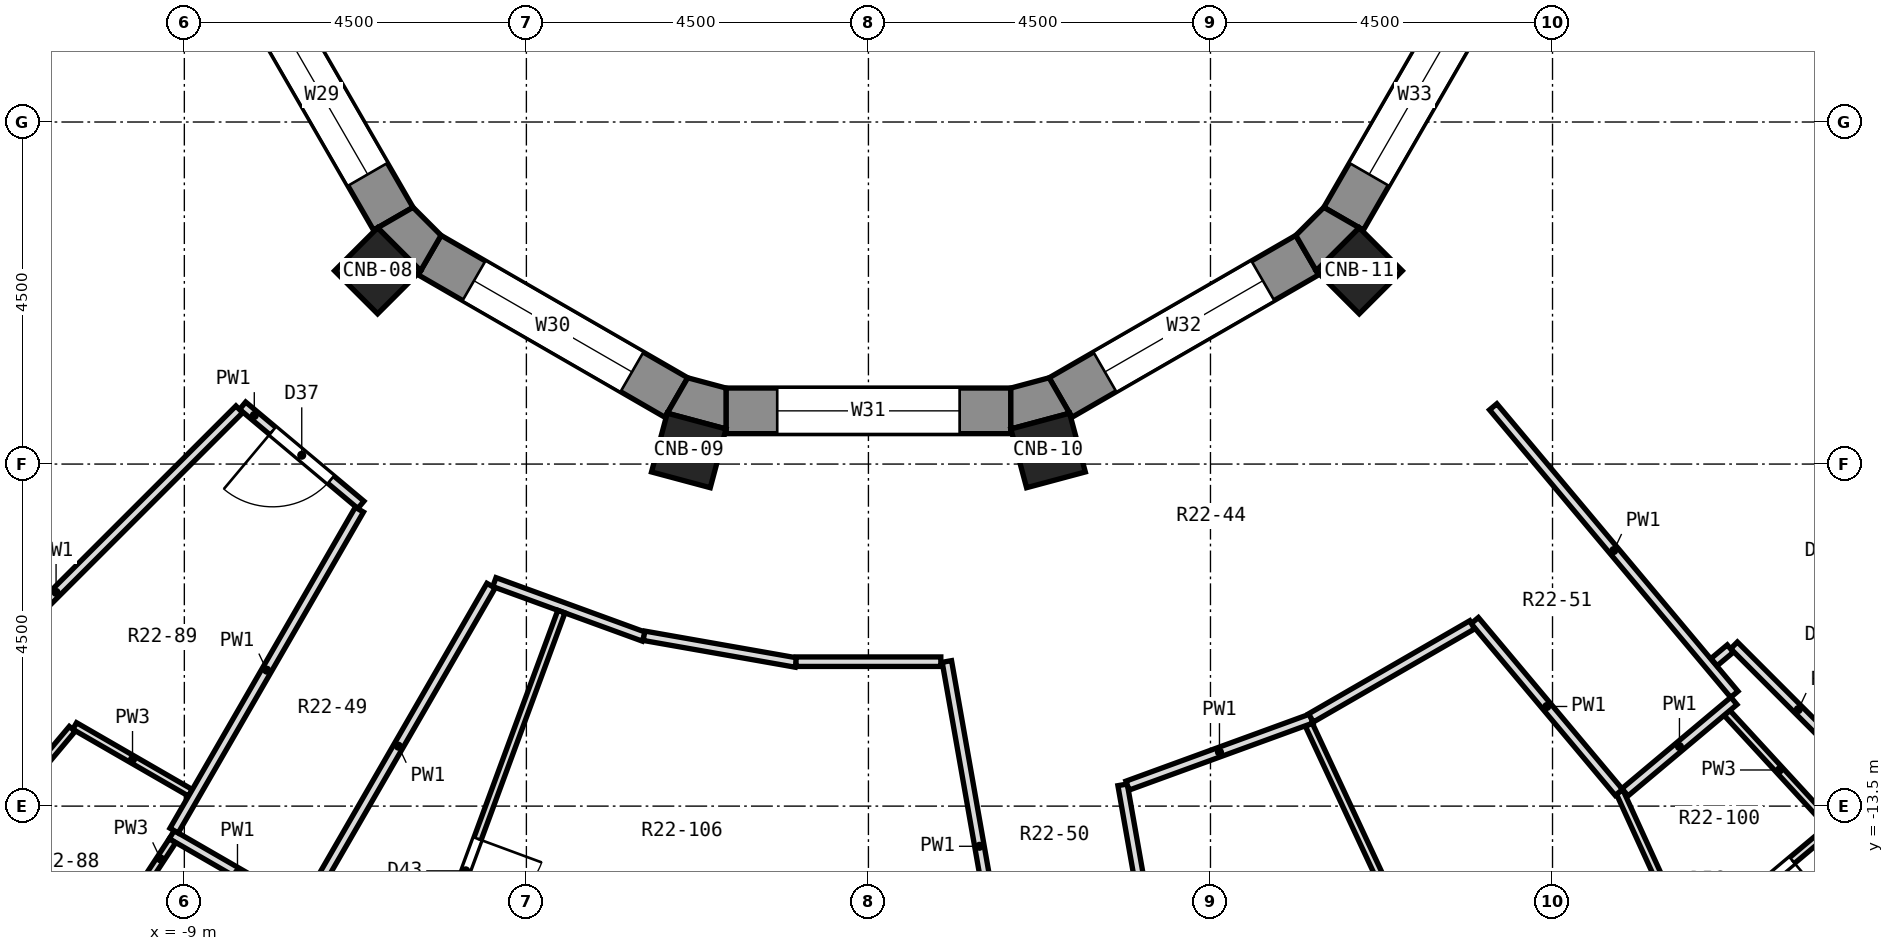
"""IFC4 building model, lengths in metres.
Left out: names, types, materials, properties, quantities, classifications, styles, units other than length and angle.
Written with IfcOpenShell. Run it as: python <this file> out.ifc"""

import sys

from ifc_helpers import new_model, si_unit, direction, frame, frame_2d, origin, origin_2d, place, context, subcontext, project, spatial, polyline, rectangle, outline, extrude, element, fill, save


model = new_model("IFC4")
c1 = context("Model", 3, precision=1e-05, world=origin(), true_north=direction((0.0, 1.0)))
c2 = subcontext(c1, "Body", "Model", "MODEL_VIEW")
j1 = project(units=[si_unit("LENGTHUNIT", "METRE"), si_unit("PLANEANGLEUNIT", "RADIAN")], contexts=[c1])
p1 = place(None, origin())
s1 = spatial("IfcSite", under=j1, at=p1, CompositionType="ELEMENT")
p2 = place(p1, origin())
s2 = spatial("IfcBuilding", under=s1, at=p2, CompositionType="ELEMENT")
p3 = place(p2, frame((0.0, 0.0, 141.4)))
s3 = spatial("IfcBuildingStorey", under=s2, at=p3, CompositionType="ELEMENT", Elevation=141.4)
for number, where, z_axis, x_axis in (
    (1, (-6.458, -6.458, 0.0), (0.0, 0.0, 1.0), (-0.707, -0.707, 0.0)),
    (2, (-2.364, -8.821, 0.0), (0.0, 0.0, 1.0), (-0.259, -0.966, 0.0)),
    (3, (2.364, -8.821, 0.0), (0.0, 0.0, 1.0), (0.259, -0.966, 0.0)),
    (4, (6.458, -6.458, 0.0), (0.0, 0.0, 1.0), (0.707, -0.707, 0.0)),
):
    element("IfcColumn", number, at=place(p3, frame(where, z_axis=z_axis, x_axis=x_axis)), inside=s3, PredefinedType="COLUMN", context=c2, shape_type="SweptSolid", body=[
        extrude(rectangle(XDim=0.8, YDim=0.8, at=origin_2d()), origin(), (0.0, 0.0, 1.0), 3.3),
    ])
p4 = place(p3, frame((-8.125, -2.527, 0.0), z_axis=(0.0, 0.0, 1.0), x_axis=(0.499964958637, -0.86604563398, 0.0)))
e5 = element("IfcWall", 5, at=p4, inside=s3, PredefinedType="SOLIDWALL", context=c2, shape_type="SweptSolid", body=[
    extrude(rectangle(XDim=3.747, YDim=0.6, at=frame_2d((1.874, 0.0))), origin(), (0.0, 0.0, 1.0), 2.8),
])
p5 = place(p4, frame((0.674, 0.0, 0.9)))
e6 = element("IfcOpeningElement", 6, at=p5, cuts=e5, PredefinedType="OPENING", context=c2, shape_type="SweptSolid", body=[
    extrude(rectangle(XDim=2.4, YDim=1.8, at=frame_2d((1.2, 0.9))), frame((0.0, 0.312, 0.0), z_axis=(0.0, -1.0, 0.0), x_axis=(1.0, 0.0, 0.0)), (0.0, 0.0, 1.0), 0.624),
])
p6 = place(p3, frame((-5.773, -6.251, 0.0), z_axis=(0.0, 0.0, 1.0), x_axis=(0.86604563398, -0.499964958637, 0.0)))
e7 = element("IfcWall", 7, at=p6, inside=s3, PredefinedType="SOLIDWALL", context=c2, shape_type="SweptSolid", body=[
    extrude(rectangle(XDim=3.747, YDim=0.6, at=frame_2d((1.874, 0.0))), origin(), (0.0, 0.0, 1.0), 2.8),
])
p7 = place(p6, frame((0.674, 0.0, 0.9)))
e8 = element("IfcOpeningElement", 8, at=p7, cuts=e7, PredefinedType="OPENING", context=c2, shape_type="SweptSolid", body=[
    extrude(rectangle(XDim=2.4, YDim=1.8, at=frame_2d((1.2, 0.9))), frame((0.0, 0.312, 0.0), z_axis=(0.0, -1.0, 0.0), x_axis=(1.0, 0.0, 0.0)), (0.0, 0.0, 1.0), 0.624),
])
p8 = place(p3, frame((-1.874, -8.3, 0.0), z_axis=(0.0, 0.0, 1.0), x_axis=(1.0, 0.0, 0.0)))
e9 = element("IfcWall", 9, at=p8, inside=s3, PredefinedType="SOLIDWALL", context=c2, shape_type="SweptSolid", body=[
    extrude(rectangle(XDim=3.748, YDim=0.6, at=frame_2d((1.874, 0.0))), origin(), (0.0, 0.0, 1.0), 2.8),
])
p9 = place(p8, frame((0.674, 0.0, 0.9)))
e10 = element("IfcOpeningElement", 10, at=p9, cuts=e9, PredefinedType="OPENING", context=c2, shape_type="SweptSolid", body=[
    extrude(rectangle(XDim=2.4, YDim=1.8, at=frame_2d((1.2, 0.9))), frame((0.0, 0.312, 0.0), z_axis=(0.0, -1.0, 0.0), x_axis=(1.0, 0.0, 0.0)), (0.0, 0.0, 1.0), 0.624),
])
p10 = place(p3, frame((2.527, -8.125, 0.0), z_axis=(0.0, 0.0, 1.0), x_axis=(0.86604563398, 0.499964958637, 0.0)))
e11 = element("IfcWall", 11, at=p10, inside=s3, PredefinedType="SOLIDWALL", context=c2, shape_type="SweptSolid", body=[
    extrude(rectangle(XDim=3.747, YDim=0.6, at=frame_2d((1.874, 0.0))), origin(), (0.0, 0.0, 1.0), 2.8),
])
p11 = place(p10, frame((0.674, 0.0, 0.9)))
e12 = element("IfcOpeningElement", 12, at=p11, cuts=e11, PredefinedType="OPENING", context=c2, shape_type="SweptSolid", body=[
    extrude(rectangle(XDim=2.4, YDim=1.8, at=frame_2d((1.2, 0.9))), frame((0.0, 0.312, 0.0), z_axis=(0.0, -1.0, 0.0), x_axis=(1.0, 0.0, 0.0)), (0.0, 0.0, 1.0), 0.624),
])
p12 = place(p3, frame((6.251, -5.773, 0.0), z_axis=(0.0, 0.0, 1.0), x_axis=(0.499964958637, 0.86604563398, 0.0)))
e13 = element("IfcWall", 13, at=p12, inside=s3, PredefinedType="SOLIDWALL", context=c2, shape_type="SweptSolid", body=[
    extrude(rectangle(XDim=3.747, YDim=0.6, at=frame_2d((1.874, 0.0))), origin(), (0.0, 0.0, 1.0), 2.8),
])
p13 = place(p12, frame((0.674, 0.0, 0.9)))
e14 = element("IfcOpeningElement", 14, at=p13, cuts=e13, PredefinedType="OPENING", context=c2, shape_type="SweptSolid", body=[
    extrude(rectangle(XDim=2.4, YDim=1.8, at=frame_2d((1.2, 0.9))), frame((0.0, 0.312, 0.0), z_axis=(0.0, -1.0, 0.0), x_axis=(1.0, 0.0, 0.0)), (0.0, 0.0, 1.0), 0.624),
])
p14 = place(p3, origin())
e15 = element("IfcWall", 15, at=p14, inside=s3, PredefinedType="SOLIDWALL", context=c2, shape_type="SweptSolid", body=[
    extrude(outline(polyline([(-6.458, -5.892), (-5.892, -6.458), (-5.623, -5.991), (-5.991, -5.623), (-6.458, -5.892)])), origin(), (0.0, 0.0, 1.0), 2.8),
])
p15 = place(p3, origin())
e16 = element("IfcWall", 16, at=p15, inside=s3, PredefinedType="SOLIDWALL", context=c2, shape_type="SweptSolid", body=[
    extrude(outline(polyline([(-1.874, -8.538), (-1.874, -8.0), (-2.377, -7.865), (-2.646, -8.331), (-1.874, -8.538)])), origin(), (0.0, 0.0, 1.0), 2.8),
])
p16 = place(p3, origin())
e17 = element("IfcWall", 17, at=p16, inside=s3, PredefinedType="SOLIDWALL", context=c2, shape_type="SweptSolid", body=[
    extrude(outline(polyline([(2.646, -8.331), (2.377, -7.865), (1.874, -8.0), (1.874, -8.538), (2.646, -8.331)])), origin(), (0.0, 0.0, 1.0), 2.8),
])
p17 = place(p3, origin())
e18 = element("IfcWall", 18, at=p17, inside=s3, PredefinedType="SOLIDWALL", context=c2, shape_type="SweptSolid", body=[
    extrude(outline(polyline([(5.892, -6.458), (6.458, -5.892), (5.991, -5.623), (5.623, -5.991), (5.892, -6.458)])), origin(), (0.0, 0.0, 1.0), 2.8),
])
p18 = place(p3, frame((1.032, -11.597, 0.0), z_axis=(0.0, 0.0, 1.0), x_axis=(0.173613257536, -0.984813909735, 0.0)))
e19 = element("IfcWall", 19, at=p18, inside=s3, PredefinedType="PARTITIONING", context=c2, shape_type="SweptSolid", body=[
    extrude(rectangle(XDim=4.937, YDim=0.125, at=frame_2d((2.469, 0.0))), origin(), (0.0, 0.0, 1.0), 2.8),
])
p19 = place(p3, frame((3.344, -13.22, 0.0), z_axis=(0.0, 0.0, 1.0), x_axis=(0.173704731119, -0.984797779438, 0.0)))
e20 = element("IfcWall", 20, at=p19, inside=s3, PredefinedType="PARTITIONING", context=c2, shape_type="SweptSolid", body=[
    extrude(rectangle(XDim=2.938, YDim=0.125, at=frame_2d((1.469, 0.0))), origin(), (0.0, 0.0, 1.0), 2.8),
])
p20 = place(p3, frame((9.883, -13.312, 0.0), z_axis=(0.0, 0.0, 1.0), x_axis=(0.415273903312, -0.909696424764, 0.0)))
e21 = element("IfcWall", 21, at=p20, inside=s3, PredefinedType="PARTITIONING", context=c2, shape_type="SweptSolid", body=[
    extrude(rectangle(XDim=5.0, YDim=0.1, at=frame_2d((2.5, 0.0))), origin(), (0.0, 0.0, 1.0), 2.8),
])
p21 = place(p20, frame((3.166, 0.0, 0.0)))
e22 = element("IfcOpeningElement", 22, at=p21, cuts=e21, PredefinedType="OPENING", context=c2, shape_type="SweptSolid", body=[
    extrude(rectangle(XDim=0.9, YDim=2.1, at=frame_2d((0.45, 1.05))), frame((0.0, 0.062, 0.0), z_axis=(0.0, -1.0, 0.0), x_axis=(1.0, 0.0, 0.0)), (0.0, 0.0, 1.0), 0.124),
])
p22 = place(p3, frame((5.794, -12.43, 0.0), z_axis=(0.0, 0.0, 1.0), x_axis=(0.422795993745, -0.906224888023, 0.0)))
e23 = element("IfcWall", 23, at=p22, inside=s3, PredefinedType="PARTITIONING", context=c2, shape_type="SweptSolid", body=[
    extrude(rectangle(XDim=11.951, YDim=0.1, at=frame_2d((5.975, 0.0))), origin(), (0.0, 0.0, 1.0), 2.8),
])
p23 = place(p22, frame((3.451, 0.0, 0.0)))
e24 = element("IfcOpeningElement", 24, at=p23, cuts=e23, PredefinedType="OPENING", context=c2, shape_type="SweptSolid", body=[
    extrude(rectangle(XDim=0.9, YDim=2.1, at=frame_2d((0.45, 1.05))), frame((0.0, 0.062, 0.0), z_axis=(0.0, -1.0, 0.0), x_axis=(1.0, 0.0, 0.0)), (0.0, 0.0, 1.0), 0.124),
])
p24 = place(p3, frame((7.977, -11.059, 0.0), z_axis=(0.0, 0.0, 1.0), x_axis=(0.642679638204, -0.766135028985, 0.0)))
e25 = element("IfcWall", 25, at=p24, inside=s3, PredefinedType="PARTITIONING", context=c2, shape_type="SweptSolid", body=[
    extrude(rectangle(XDim=2.95, YDim=0.125, at=frame_2d((1.475, 0.0))), origin(), (0.0, 0.0, 1.0), 2.8),
])
p25 = place(p3, frame((8.22, -8.247, 0.0), z_axis=(0.0, 0.0, 1.0), x_axis=(0.642555132876, -0.766239454228, 0.0)))
e26 = element("IfcWall", 26, at=p25, inside=s3, PredefinedType="PARTITIONING", context=c2, shape_type="SweptSolid", body=[
    extrude(rectangle(XDim=4.937, YDim=0.125, at=frame_2d((2.468, 0.0))), origin(), (0.0, 0.0, 1.0), 2.8),
])
p26 = place(p3, frame((11.295, -12.274, 0.0), z_axis=(0.0, 0.0, 1.0), x_axis=(0.676981317167, -0.736000201228, 0.0)))
e27 = element("IfcWall", 27, at=p26, inside=s3, PredefinedType="PARTITIONING", context=c2, shape_type="SweptSolid", body=[
    extrude(rectangle(XDim=2.039, YDim=0.1, at=frame_2d((1.02, 0.0))), origin(), (0.0, 0.0, 1.0), 2.8),
])
p27 = place(p3, frame((11.388, -11.385, 0.0), z_axis=(0.0, 0.0, 1.0), x_axis=(0.707157874563, -0.707055684118, 0.0)))
e28 = element("IfcWall", 28, at=p27, inside=s3, PredefinedType="PARTITIONING", context=c2, shape_type="SweptSolid", body=[
    extrude(rectangle(XDim=2.389, YDim=0.125, at=frame_2d((1.195, 0.0))), origin(), (0.0, 0.0, 1.0), 2.8),
])
p28 = place(p3, frame((-8.233, -8.232, 0.0), z_axis=(0.0, 0.0, 1.0), x_axis=(0.766275589864, -0.642512039092, 0.0)))
e29 = element("IfcWall", 29, at=p28, inside=s3, PredefinedType="PARTITIONING", context=c2, shape_type="SweptSolid", body=[
    extrude(rectangle(XDim=2.03, YDim=0.125, at=frame_2d((1.015, 0.0))), origin(), (0.0, 0.0, 1.0), 2.8),
])
p29 = place(p28, frame((0.515, 0.0, 0.0)))
e30 = element("IfcOpeningElement", 30, at=p29, cuts=e29, PredefinedType="OPENING", context=c2, shape_type="SweptSolid", body=[
    extrude(rectangle(XDim=1.0, YDim=2.1, at=frame_2d((0.5, 1.05))), frame((0.0, 0.074, 0.0), z_axis=(0.0, -1.0, 0.0), x_axis=(1.0, 0.0, 0.0)), (0.0, 0.0, 1.0), 0.149),
])
p30 = place(p3, frame((-9.166, -13.876, 0.0), z_axis=(0.0, 0.0, 1.0), x_axis=(0.866008543052, -0.500029202507, 0.0)))
e31 = element("IfcWall", 31, at=p30, inside=s3, PredefinedType="PARTITIONING", context=c2, shape_type="SweptSolid", body=[
    extrude(rectangle(XDim=1.998, YDim=0.125, at=frame_2d((0.999, 0.0))), origin(), (0.0, 0.0, 1.0), 2.8),
])
p31 = place(p3, frame((-10.443, -12.446, 0.0), z_axis=(0.0, 0.0, 1.0), x_axis=(0.866176339187, -0.499738481041, 0.0)))
e32 = element("IfcWall", 32, at=p31, inside=s3, PredefinedType="PARTITIONING", context=c2, shape_type="SweptSolid", body=[
    extrude(rectangle(XDim=1.758, YDim=0.1, at=frame_2d((0.879, 0.0))), origin(), (0.0, 0.0, 1.0), 2.8),
])
p32 = place(p3, frame((-4.921, -10.553, 0.0), z_axis=(0.0, 0.0, 1.0), x_axis=(0.939408005118, -0.342801108399, 0.0)))
e33 = element("IfcWall", 33, at=p32, inside=s3, PredefinedType="PARTITIONING", context=c2, shape_type="SweptSolid", body=[
    extrude(rectangle(XDim=2.093, YDim=0.125, at=frame_2d((1.046, 0.0))), origin(), (0.0, 0.0, 1.0), 2.8),
])
p33 = place(p3, frame((-2.952, -11.259, 0.0), z_axis=(0.0, 0.0, 1.0), x_axis=(0.984837972304, -0.173476708256, 0.0)))
e34 = element("IfcWall", 34, at=p33, inside=s3, PredefinedType="PARTITIONING", context=c2, shape_type="SweptSolid", body=[
    extrude(rectangle(XDim=2.031, YDim=0.125, at=frame_2d((1.015, 0.0))), origin(), (0.0, 0.0, 1.0), 2.8),
])
p34 = place(p3, frame((-0.952, -11.6, 0.0), z_axis=(0.0, 0.0, 1.0), x_axis=(1.0, 0.0, 0.0)))
e35 = element("IfcWall", 35, at=p34, inside=s3, PredefinedType="PARTITIONING", context=c2, shape_type="SweptSolid", body=[
    extrude(rectangle(XDim=1.905, YDim=0.125, at=frame_2d((0.952, 0.0))), origin(), (0.0, 0.0, 1.0), 2.8),
])
p35 = place(p3, frame((3.409, -13.23, 0.0), z_axis=(0.0, 0.0, 1.0), x_axis=(0.939430059453, 0.34274066493, 0.0)))
e36 = element("IfcWall", 36, at=p35, inside=s3, PredefinedType="PARTITIONING", context=c2, shape_type="SweptSolid", body=[
    extrude(rectangle(XDim=2.573, YDim=0.125, at=frame_2d((1.287, 0.0))), origin(), (0.0, 0.0, 1.0), 2.8),
])
p36 = place(p3, frame((5.822, -12.34, 0.0), z_axis=(0.0, 0.0, 1.0), x_axis=(0.865951440693, 0.500128085955, 0.0)))
e37 = element("IfcWall", 37, at=p36, inside=s3, PredefinedType="PARTITIONING", context=c2, shape_type="SweptSolid", body=[
    extrude(rectangle(XDim=2.448, YDim=0.125, at=frame_2d((1.224, 0.0))), origin(), (0.0, 0.0, 1.0), 2.8),
])
p37 = place(p3, frame((11.125, -11.606, 0.0), z_axis=(0.0, 0.0, 1.0), x_axis=(0.766857755144, 0.641817094955, 0.0)))
e38 = element("IfcWall", 38, at=p37, inside=s3, PredefinedType="PARTITIONING", context=c2, shape_type="SweptSolid", body=[
    extrude(rectangle(XDim=0.279, YDim=0.125, at=frame_2d((0.14, 0.0))), origin(), (0.0, 0.0, 1.0), 2.8),
])
p38 = place(p3, frame((10.848, -15.307, 0.0), z_axis=(0.0, 0.0, 1.0), x_axis=(0.766356114298, 0.642415991456, 0.0)))
e39 = element("IfcWall", 39, at=p38, inside=s3, PredefinedType="PARTITIONING", context=c2, shape_type="SweptSolid", body=[
    extrude(rectangle(XDim=2.332, YDim=0.1, at=frame_2d((1.166, 0.0))), origin(), (0.0, 0.0, 1.0), 2.8),
])
p39 = place(p38, frame((0.902, 0.0, 0.0)))
e40 = element("IfcOpeningElement", 40, at=p39, cuts=e39, PredefinedType="OPENING", context=c2, shape_type="SweptSolid", body=[
    extrude(rectangle(XDim=0.8, YDim=2.1, at=frame_2d((0.4, 1.05))), frame((0.0, 0.062, 0.0), z_axis=(0.0, -1.0, 0.0), x_axis=(1.0, 0.0, 0.0)), (0.0, 0.0, 1.0), 0.124),
])
p40 = place(p3, frame((9.954, -13.317, 0.0), z_axis=(0.0, 0.0, 1.0), x_axis=(0.766162509907, 0.642646876919, 0.0)))
e41 = element("IfcWall", 41, at=p40, inside=s3, PredefinedType="PARTITIONING", context=c2, shape_type="SweptSolid", body=[
    extrude(rectangle(XDim=1.87, YDim=0.125, at=frame_2d((0.935, 0.0))), origin(), (0.0, 0.0, 1.0), 2.8),
])
p41 = place(p3, frame((-13.097, -13.096, 0.0), z_axis=(0.0, 0.0, 1.0), x_axis=(0.707375421738, 0.706838038536, 0.0)))
e42 = element("IfcWall", 42, at=p41, inside=s3, PredefinedType="PARTITIONING", context=c2, shape_type="SweptSolid", body=[
    extrude(rectangle(XDim=6.815, YDim=0.125, at=frame_2d((3.407, 0.0))), origin(), (0.0, 0.0, 1.0), 2.8),
])
p42 = place(p3, frame((-11.509, -13.715, 0.0), z_axis=(0.0, 0.0, 1.0), x_axis=(0.643138636987, 0.765749759134, 0.0)))
e43 = element("IfcWall", 43, at=p42, inside=s3, PredefinedType="PARTITIONING", context=c2, shape_type="SweptSolid", body=[
    extrude(rectangle(XDim=1.607, YDim=0.1, at=frame_2d((0.803, 0.0))), origin(), (0.0, 0.0, 1.0), 2.8),
])
p43 = place(p3, frame((-10.246, -15.616, 0.0), z_axis=(0.0, 0.0, 1.0), x_axis=(0.548583914552, 0.836095502138, 0.0)))
e44 = element("IfcWall", 44, at=p43, inside=s3, PredefinedType="PARTITIONING", context=c2, shape_type="SweptSolid", body=[
    extrude(rectangle(XDim=1.985, YDim=0.1, at=frame_2d((0.993, 0.0))), origin(), (0.0, 0.0, 1.0), 2.8),
])
p44 = place(p43, frame((0.599, 0.0, 0.0)))
e45 = element("IfcOpeningElement", 45, at=p44, cuts=e44, PredefinedType="OPENING", context=c2, shape_type="SweptSolid", body=[
    extrude(rectangle(XDim=0.8, YDim=2.1, at=frame_2d((0.4, 1.05))), frame((0.0, 0.062, 0.0), z_axis=(0.0, -1.0, 0.0), x_axis=(1.0, 0.0, 0.0)), (0.0, 0.0, 1.0), 0.124),
])
for number, where, z_axis, x_axis in (
    (46, (-7.403, -14.822, 0.0), (0.0, 0.0, 1.0), (0.5, 0.866, 0.0)),
    (47, (-9.135, -13.822, 0.0), (0.0, 0.0, 1.0), (0.5, 0.866, 0.0)),
):
    element("IfcWall", number, at=place(p3, frame(where, z_axis=z_axis, x_axis=x_axis)), inside=s3, PredefinedType="PARTITIONING", context=c2, shape_type="SweptSolid", body=[
        extrude(rectangle(XDim=4.875, YDim=0.125, at=frame_2d((2.438, 0.0))), origin(), (0.0, 0.0, 1.0), 2.8),
    ])
p45 = place(p3, frame((-6.562, -17.776, 0.0), z_axis=(0.0, 0.0, 1.0), x_axis=(0.346197589544, 0.938161622, 0.0)))
e48 = element("IfcWall", 48, at=p45, inside=s3, PredefinedType="PARTITIONING", context=c2, shape_type="SweptSolid", body=[
    extrude(rectangle(XDim=7.285, YDim=0.1, at=frame_2d((3.643, 0.0))), origin(), (0.0, 0.0, 1.0), 2.8),
])
p46 = place(p45, frame((3.2, 0.0, 0.0)))
e49 = element("IfcOpeningElement", 49, at=p46, cuts=e48, PredefinedType="OPENING", context=c2, shape_type="SweptSolid", body=[
    extrude(rectangle(XDim=0.9, YDim=2.1, at=frame_2d((0.45, 1.05))), frame((0.0, 0.062, 0.0), z_axis=(0.0, -1.0, 0.0), x_axis=(1.0, 0.0, 0.0)), (0.0, 0.0, 1.0), 0.124),
])
p47 = place(p5, origin())
e50 = element("IfcWindow", 50, at=p47, inside=s3, PartitioningType="SINGLE_PANEL", PredefinedType="WINDOW", context=c2, shape_type="SweptSolid", body=[
    extrude(rectangle(XDim=2.4, YDim=1.8, at=frame_2d((1.2, 0.9))), frame((0.0, -0.12, 0.0), z_axis=(0.0, -1.0, 0.0), x_axis=(1.0, 0.0, 0.0)), (0.0, 0.0, 1.0), 0.06),
])
fill(e6, e50)
p48 = place(p7, origin())
e51 = element("IfcWindow", 51, at=p48, inside=s3, PartitioningType="SINGLE_PANEL", PredefinedType="WINDOW", context=c2, shape_type="SweptSolid", body=[
    extrude(rectangle(XDim=2.4, YDim=1.8, at=frame_2d((1.2, 0.9))), frame((0.0, -0.12, 0.0), z_axis=(0.0, -1.0, 0.0), x_axis=(1.0, 0.0, 0.0)), (0.0, 0.0, 1.0), 0.06),
])
fill(e8, e51)
p49 = place(p9, origin())
e52 = element("IfcWindow", 52, at=p49, inside=s3, PartitioningType="SINGLE_PANEL", PredefinedType="WINDOW", context=c2, shape_type="SweptSolid", body=[
    extrude(rectangle(XDim=2.4, YDim=1.8, at=frame_2d((1.2, 0.9))), frame((0.0, -0.12, 0.0), z_axis=(0.0, -1.0, 0.0), x_axis=(1.0, 0.0, 0.0)), (0.0, 0.0, 1.0), 0.06),
])
fill(e10, e52)
p50 = place(p11, origin())
e53 = element("IfcWindow", 53, at=p50, inside=s3, PartitioningType="SINGLE_PANEL", PredefinedType="WINDOW", context=c2, shape_type="SweptSolid", body=[
    extrude(rectangle(XDim=2.4, YDim=1.8, at=frame_2d((1.2, 0.9))), frame((0.0, -0.12, 0.0), z_axis=(0.0, -1.0, 0.0), x_axis=(1.0, 0.0, 0.0)), (0.0, 0.0, 1.0), 0.06),
])
fill(e12, e53)
p51 = place(p13, origin())
e54 = element("IfcWindow", 54, at=p51, inside=s3, PartitioningType="SINGLE_PANEL", PredefinedType="WINDOW", context=c2, shape_type="SweptSolid", body=[
    extrude(rectangle(XDim=2.4, YDim=1.8, at=frame_2d((1.2, 0.9))), frame((0.0, -0.12, 0.0), z_axis=(0.0, -1.0, 0.0), x_axis=(1.0, 0.0, 0.0)), (0.0, 0.0, 1.0), 0.06),
])
fill(e14, e54)
p52 = place(p29, frame((1.0, 0.0, 0.0), z_axis=(0.0, 0.0, 1.0), x_axis=(-1.0, 0.0, 0.0)))
e55 = element("IfcDoor", 55, at=p52, inside=s3, OperationType="SINGLE_SWING_RIGHT", PredefinedType="DOOR", context=c2, shape_type="SweptSolid", body=[
    extrude(rectangle(XDim=1.0, YDim=2.1, at=frame_2d((0.5, 1.05))), frame((0.0, 0.025, 0.0), z_axis=(0.0, -1.0, 0.0), x_axis=(1.0, 0.0, 0.0)), (0.0, 0.0, 1.0), 0.05),
])
fill(e30, e55)
p53 = place(p46, frame((0.9, 0.0, 0.0), z_axis=(0.0, 0.0, 1.0), x_axis=(-1.0, 0.0, 0.0)))
e56 = element("IfcDoor", 56, at=p53, inside=s3, OperationType="SINGLE_SWING_LEFT", PredefinedType="DOOR", context=c2, shape_type="SweptSolid", body=[
    extrude(rectangle(XDim=0.9, YDim=2.1, at=frame_2d((0.45, 1.05))), frame((0.0, 0.025, 0.0), z_axis=(0.0, -1.0, 0.0), x_axis=(1.0, 0.0, 0.0)), (0.0, 0.0, 1.0), 0.05),
])
fill(e49, e56)
p54 = place(p39, frame((0.8, 0.0, 0.0), z_axis=(0.0, 0.0, 1.0), x_axis=(-1.0, 0.0, 0.0)))
e57 = element("IfcDoor", 57, at=p54, inside=s3, OperationType="SINGLE_SWING_LEFT", PredefinedType="DOOR", context=c2, shape_type="SweptSolid", body=[
    extrude(rectangle(XDim=0.8, YDim=2.1, at=frame_2d((0.4, 1.05))), frame((0.0, 0.025, 0.0), z_axis=(0.0, -1.0, 0.0), x_axis=(1.0, 0.0, 0.0)), (0.0, 0.0, 1.0), 0.05),
])
fill(e40, e57)
save(model, sys.argv[1])
